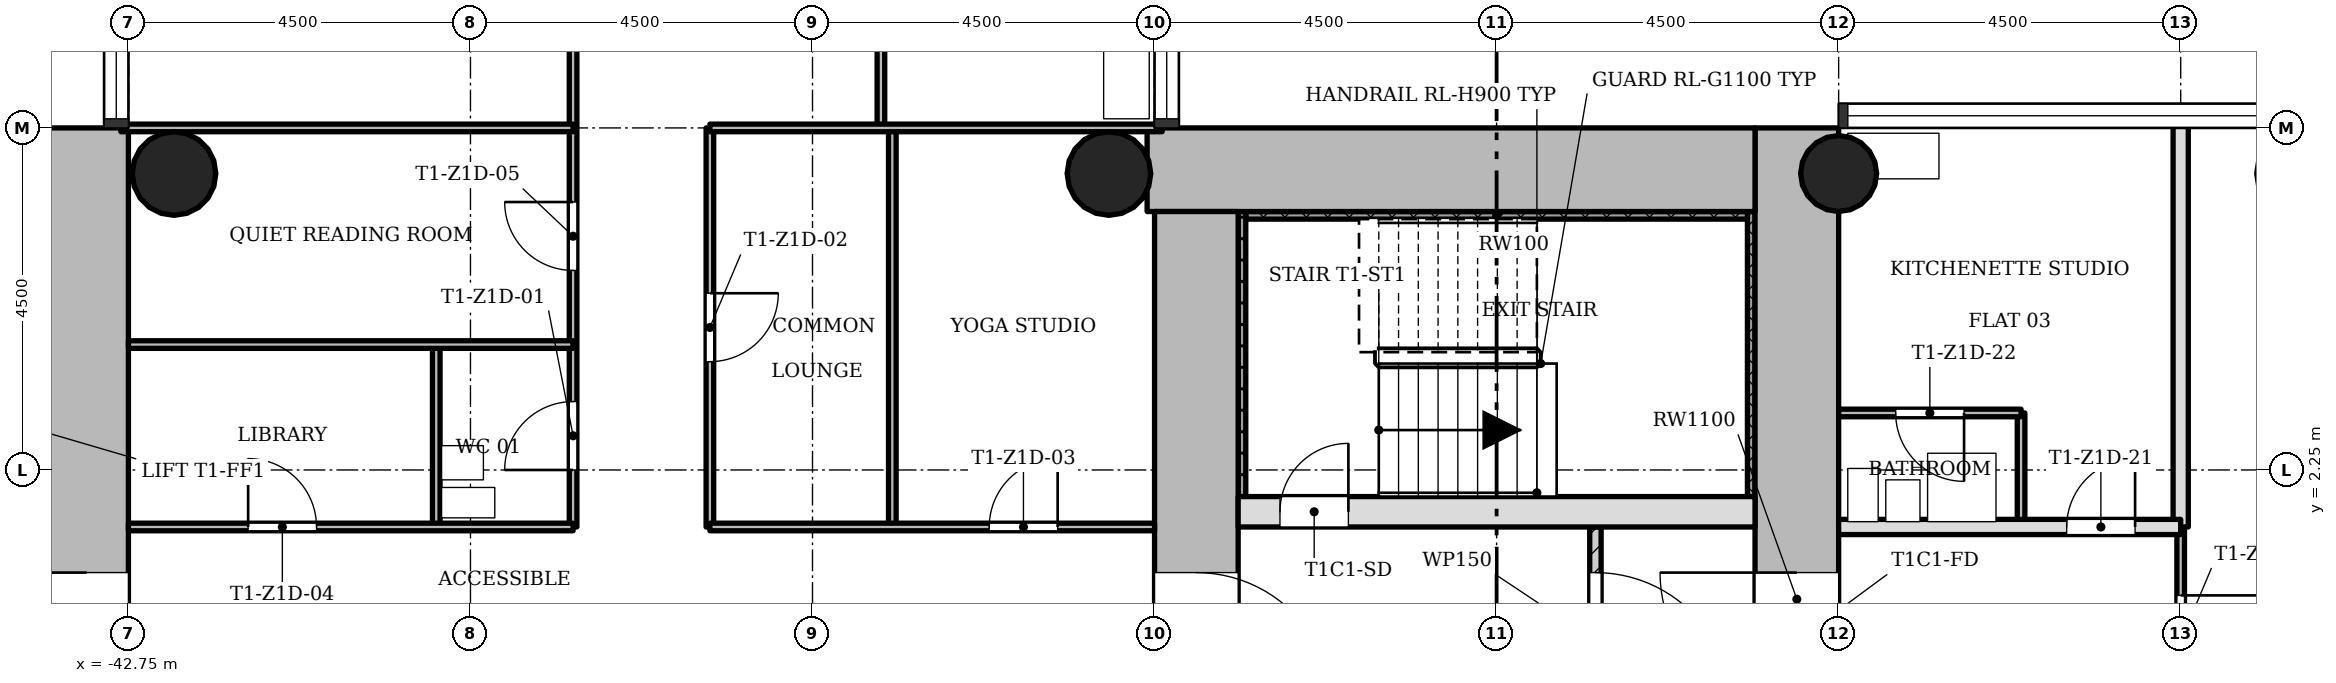
"""IFC4 building model, lengths in metres.
Left out: names, types, materials, properties, quantities, classifications, styles, units other than length and angle.
Written with IfcOpenShell. Run it as: python <this file> out.ifc"""

import sys

from ifc_helpers import new_model, si_unit, direction, frame, frame_2d, origin, origin_2d, place, context, subcontext, project, spatial, rectangle, hollow_circle, extrude, element, fill, save


model = new_model("IFC4")
c1 = context("Model", 3, precision=1e-05, world=origin(), true_north=direction((0.0, 1.0)))
c2 = subcontext(c1, "Body", "Model", "MODEL_VIEW")
j1 = project(units=[si_unit("LENGTHUNIT", "METRE"), si_unit("PLANEANGLEUNIT", "RADIAN")], contexts=[c1])
p1 = place(None, origin())
s1 = spatial("IfcSite", under=j1, at=p1, CompositionType="ELEMENT")
p2 = place(p1, origin())
s2 = spatial("IfcBuilding", under=s1, at=p2, CompositionType="ELEMENT")
p3 = place(p2, frame((0.0, 0.0, 61.9)))
s3 = spatial("IfcBuildingStorey", under=s2, at=p3, CompositionType="ELEMENT", Elevation=61.9)
p4 = place(p3, frame((-20.8, -5.65, 0.0), z_axis=(0.0, 0.0, 1.0), x_axis=(0.0, 1.0, 0.0)))
e1 = element("IfcWall", 1, at=p4, inside=s3, PredefinedType="SHEAR", context=c2, shape_type="SweptSolid", body=[
    extrude(rectangle(XDim=12.4, YDim=1.1, at=frame_2d((6.2, 0.0))), origin(), (0.0, 0.0, 1.0), 3.4),
])
p5 = place(p4, frame((4.75, 0.0, 0.0)))
e2 = element("IfcOpeningElement", 2, at=p5, cuts=e1, PredefinedType="OPENING", context=c2, shape_type="SweptSolid", body=[
    extrude(rectangle(XDim=1.8, YDim=2.1, at=frame_2d((0.9, 1.05))), frame((0.0, 0.56, 0.0), z_axis=(0.0, -1.0, 0.0), x_axis=(1.0, 0.0, 0.0)), (0.0, 0.0, 1.0), 1.12),
])
p6 = place(p3, frame((-21.35, 6.2, 0.0), z_axis=(0.0, 0.0, 1.0), x_axis=(-1.0, 0.0, 0.0)))
e3 = element("IfcWall", 3, at=p6, inside=s3, PredefinedType="SHEAR", context=c2, shape_type="SweptSolid", body=[
    extrude(rectangle(XDim=7.998, YDim=1.1, at=frame_2d((3.999, 0.0))), origin(), (0.0, 0.0, 1.0), 3.4),
])
p7 = place(p3, frame((-28.7, 5.65, 0.0), z_axis=(0.0, 0.0, 1.0), x_axis=(0.0, -1.0, 0.0)))
e4 = element("IfcWall", 4, at=p7, inside=s3, PredefinedType="SHEAR", context=c2, shape_type="SweptSolid", body=[
    extrude(rectangle(XDim=12.4, YDim=1.1, at=frame_2d((6.2, 0.0))), origin(), (0.0, 0.0, 1.0), 3.4),
])
p8 = place(p7, frame((4.75, 0.0, 0.0)))
e5 = element("IfcOpeningElement", 5, at=p8, cuts=e4, PredefinedType="OPENING", context=c2, shape_type="SweptSolid", body=[
    extrude(rectangle(XDim=1.8, YDim=2.1, at=frame_2d((0.9, 1.05))), frame((0.0, 0.56, 0.0), z_axis=(0.0, -1.0, 0.0), x_axis=(1.0, 0.0, 0.0)), (0.0, 0.0, 1.0), 1.12),
])
p9 = place(p3, frame((-28.15, 1.7, 0.0), z_axis=(0.0, 0.0, 1.0), x_axis=(1.0, 0.0, 0.0)))
e6 = element("IfcWall", 6, at=p9, inside=s3, PredefinedType="SHEAR", context=c2, shape_type="SweptSolid", body=[
    extrude(rectangle(XDim=6.8, YDim=0.4, at=frame_2d((3.4, 0.0))), origin(), (0.0, 0.0, 1.0), 3.4),
])
p10 = place(p9, frame((0.55, 0.0, 0.0)))
e7 = element("IfcOpeningElement", 7, at=p10, cuts=e6, PredefinedType="OPENING", context=c2, shape_type="SweptSolid", body=[
    extrude(rectangle(XDim=0.9, YDim=2.1, at=frame_2d((0.45, 1.05))), frame((0.0, 0.21, 0.0), z_axis=(0.0, -1.0, 0.0), x_axis=(1.0, 0.0, 0.0)), (0.0, 0.0, 1.0), 0.42),
])
p11 = place(p3, frame((-43.3, -5.65, 0.0), z_axis=(0.0, 0.0, 1.0), x_axis=(0.0, 1.0, 0.0)))
e8 = element("IfcWall", 8, at=p11, inside=s3, PredefinedType="SHEAR", context=c2, shape_type="SweptSolid", body=[
    extrude(rectangle(XDim=12.4, YDim=1.1, at=frame_2d((6.2, 0.0))), origin(), (0.0, 0.0, 1.0), 3.4),
])
p12 = place(p11, frame((4.75, 0.0, 0.0)))
e9 = element("IfcOpeningElement", 9, at=p12, cuts=e8, PredefinedType="OPENING", context=c2, shape_type="SweptSolid", body=[
    extrude(rectangle(XDim=1.8, YDim=2.1, at=frame_2d((0.9, 1.05))), frame((0.0, 0.56, 0.0), z_axis=(0.0, -1.0, 0.0), x_axis=(1.0, 0.0, 0.0)), (0.0, 0.0, 1.0), 1.12),
])
p13 = place(p3, frame((-20.25, 6.15, 0.0), z_axis=(0.0, 0.0, 1.0), x_axis=(1.0, 0.0, 0.0)))
e10 = element("IfcColumn", 10, at=p13, inside=s3, PredefinedType="COLUMN", context=c2, shape_type="SweptSolid", body=[
    extrude(hollow_circle(Radius=0.5, WallThickness=0.036, at=origin_2d()), origin(), (0.0, 0.0, 1.0), 3.4),
])
for number, where, z_axis, x_axis in (
    (11, (-29.85, 6.15, 0.0), (0.0, 0.0, 1.0), (1.0, 0.0, 0.0)),
    (12, (-42.15, 6.15, 0.0), (0.0, 0.0, 1.0), (1.0, 0.0, 0.0)),
):
    element("IfcColumn", number, at=place(p3, frame(where, z_axis=z_axis, x_axis=x_axis)), inside=s3, PredefinedType="COLUMN", context=c2, shape_type="SweptSolid", body=[
        extrude(hollow_circle(Radius=0.55, WallThickness=0.04, at=origin_2d()), origin(), (0.0, 0.0, 1.0), 3.4),
    ])
p14 = place(p3, frame((-23.45, -1.5, 0.0), z_axis=(0.0, 0.0, 1.0), x_axis=(0.0, 1.0, 0.0)))
e13 = element("IfcWall", 13, at=p14, inside=s3, PredefinedType="PARTITIONING", context=c2, shape_type="SweptSolid", body=[
    extrude(rectangle(XDim=3.0, YDim=0.15, at=frame_2d((1.5, 0.0))), origin(), (0.0, 0.0, 1.0), 3.0),
])
p15 = place(p14, frame((0.6, 0.0, 0.0)))
e14 = element("IfcOpeningElement", 14, at=p15, cuts=e13, PredefinedType="OPENING", context=c2, shape_type="SweptSolid", body=[
    extrude(rectangle(XDim=1.8, YDim=2.1, at=frame_2d((0.9, 1.05))), frame((0.0, 0.085, 0.0), z_axis=(0.0, -1.0, 0.0), x_axis=(1.0, 0.0, 0.0)), (0.0, 0.0, 1.0), 0.17),
])
p16 = place(p3, frame((-38.7, 1.5, 0.0), z_axis=(0.0, 0.0, 1.0), x_axis=(0.0, 1.0, 0.0)))
e15 = element("IfcWall", 15, at=p16, inside=s3, PredefinedType="PARTITIONING", context=c2, shape_type="SweptSolid", body=[
    extrude(rectangle(XDim=2.4, YDim=0.1, at=frame_2d((1.2, 0.0))), origin(), (0.0, 0.0, 1.0), 3.0),
])
p17 = place(p3, frame((-36.9, 1.5, 0.0), z_axis=(0.0, 0.0, 1.0), x_axis=(0.0, 1.0, 0.0)))
e16 = element("IfcWall", 16, at=p17, inside=s3, PredefinedType="PARTITIONING", context=c2, shape_type="SweptSolid", body=[
    extrude(rectangle(XDim=7.05, YDim=0.1, at=frame_2d((3.525, 0.0))), origin(), (0.0, 0.0, 1.0), 3.0),
])
p18 = place(p17, frame((0.75, 0.0, 0.0)))
e17 = element("IfcOpeningElement", 17, at=p18, cuts=e16, PredefinedType="OPENING", context=c2, shape_type="SweptSolid", body=[
    extrude(rectangle(XDim=0.9, YDim=2.1, at=frame_2d((0.45, 1.05))), frame((0.0, 0.06, 0.0), z_axis=(0.0, -1.0, 0.0), x_axis=(1.0, 0.0, 0.0)), (0.0, 0.0, 1.0), 0.12),
])
p19 = place(p17, frame((3.375, 0.0, 0.0)))
e18 = element("IfcOpeningElement", 18, at=p19, cuts=e16, PredefinedType="OPENING", context=c2, shape_type="SweptSolid", body=[
    extrude(rectangle(XDim=0.9, YDim=2.1, at=frame_2d((0.45, 1.05))), frame((0.0, 0.06, 0.0), z_axis=(0.0, -1.0, 0.0), x_axis=(1.0, 0.0, 0.0)), (0.0, 0.0, 1.0), 0.12),
])
p20 = place(p3, frame((-35.1, 1.5, 0.0), z_axis=(0.0, 0.0, 1.0), x_axis=(0.0, 1.0, 0.0)))
e19 = element("IfcWall", 19, at=p20, inside=s3, PredefinedType="PARTITIONING", context=c2, shape_type="SweptSolid", body=[
    extrude(rectangle(XDim=5.25, YDim=0.1, at=frame_2d((2.625, 0.0))), origin(), (0.0, 0.0, 1.0), 3.0),
])
p21 = place(p20, frame((2.175, 0.0, 0.0)))
e20 = element("IfcOpeningElement", 20, at=p21, cuts=e19, PredefinedType="OPENING", context=c2, shape_type="SweptSolid", body=[
    extrude(rectangle(XDim=0.9, YDim=2.1, at=frame_2d((0.45, 1.05))), frame((0.0, 0.06, 0.0), z_axis=(0.0, -1.0, 0.0), x_axis=(1.0, 0.0, 0.0)), (0.0, 0.0, 1.0), 0.12),
])
p22 = place(p3, frame((-32.85, 6.75, 0.0), z_axis=(0.0, 0.0, 1.0), x_axis=(0.0, 1.0, 0.0)))
e21 = element("IfcWall", 21, at=p22, inside=s3, PredefinedType="PARTITIONING", context=c2, shape_type="SweptSolid", body=[
    extrude(rectangle(XDim=9.0, YDim=0.1, at=frame_2d((4.5, 0.0))), origin(), (0.0, 0.0, 1.0), 3.0),
])
p23 = place(p22, frame((1.8, 0.0, 0.0)))
e22 = element("IfcOpeningElement", 22, at=p23, cuts=e21, PredefinedType="OPENING", context=c2, shape_type="SweptSolid", body=[
    extrude(rectangle(XDim=0.9, YDim=2.1, at=frame_2d((0.45, 1.05))), frame((0.0, 0.06, 0.0), z_axis=(0.0, -1.0, 0.0), x_axis=(1.0, 0.0, 0.0)), (0.0, 0.0, 1.0), 0.12),
])
p24 = place(p22, frame((6.3, 0.0, 0.0)))
e23 = element("IfcOpeningElement", 23, at=p24, cuts=e21, PredefinedType="OPENING", context=c2, shape_type="SweptSolid", body=[
    extrude(rectangle(XDim=0.9, YDim=2.1, at=frame_2d((0.45, 1.05))), frame((0.0, 0.06, 0.0), z_axis=(0.0, -1.0, 0.0), x_axis=(1.0, 0.0, 0.0)), (0.0, 0.0, 1.0), 0.12),
])
p25 = place(p3, frame((-32.7, 1.5, 0.0), z_axis=(0.0, 0.0, 1.0), x_axis=(0.0, 1.0, 0.0)))
e24 = element("IfcWall", 24, at=p25, inside=s3, PredefinedType="PARTITIONING", context=c2, shape_type="SweptSolid", body=[
    extrude(rectangle(XDim=5.25, YDim=0.1, at=frame_2d((2.625, 0.0))), origin(), (0.0, 0.0, 1.0), 3.0),
])
p26 = place(p3, frame((-17.85, 1.5, 0.0), z_axis=(0.0, 0.0, 1.0), x_axis=(0.0, 1.0, 0.0)))
e25 = element("IfcWall", 25, at=p26, inside=s3, PredefinedType="PARTITIONING", context=c2, shape_type="SweptSolid", body=[
    extrude(rectangle(XDim=1.5, YDim=0.1, at=frame_2d((0.75, 0.0))), origin(), (0.0, 0.0, 1.0), 3.0),
])
p27 = place(p3, frame((-15.75, -6.85, 0.0), z_axis=(0.0, 0.0, 1.0), x_axis=(0.0, 1.0, 0.0)))
e26 = element("IfcWall", 26, at=p27, inside=s3, PredefinedType="PARTITIONING", context=c2, shape_type="SweptSolid", body=[
    extrude(rectangle(XDim=8.35, YDim=0.1, at=frame_2d((4.175, 0.0))), origin(), (0.0, 0.0, 1.0), 3.0),
])
p28 = place(p27, frame((6.25, 0.0, 0.0)))
e27 = element("IfcOpeningElement", 27, at=p28, cuts=e26, PredefinedType="OPENING", context=c2, shape_type="SweptSolid", body=[
    extrude(rectangle(XDim=1.2, YDim=2.1, at=frame_2d((0.6, 1.05))), frame((0.0, 0.06, 0.0), z_axis=(0.0, -1.0, 0.0), x_axis=(1.0, 0.0, 0.0)), (0.0, 0.0, 1.0), 0.12),
])
p29 = place(p3, frame((-15.75, 1.5, 0.0), z_axis=(0.0, 0.0, 1.0), x_axis=(0.0, 1.0, 0.0)))
e28 = element("IfcWall", 28, at=p29, inside=s3, PredefinedType="SOLIDWALL", context=c2, shape_type="SweptSolid", body=[
    extrude(rectangle(XDim=5.35, YDim=0.2, at=frame_2d((2.675, 0.0))), origin(), (0.0, 0.0, 1.0), 3.0),
])
p30 = place(p3, frame((-42.75, 1.5, 0.0), z_axis=(0.0, 0.0, 1.0), x_axis=(1.0, 0.0, 0.0)))
e29 = element("IfcWall", 29, at=p30, inside=s3, PredefinedType="PARTITIONING", context=c2, shape_type="SweptSolid", body=[
    extrude(rectangle(XDim=5.85, YDim=0.1, at=frame_2d((2.925, 0.0))), origin(), (0.0, 0.0, 1.0), 3.0),
])
p31 = place(p30, frame((1.575, 0.0, 0.0)))
e30 = element("IfcOpeningElement", 30, at=p31, cuts=e29, PredefinedType="OPENING", context=c2, shape_type="SweptSolid", body=[
    extrude(rectangle(XDim=0.9, YDim=2.1, at=frame_2d((0.45, 1.05))), frame((0.0, 0.06, 0.0), z_axis=(0.0, -1.0, 0.0), x_axis=(1.0, 0.0, 0.0)), (0.0, 0.0, 1.0), 0.12),
])
p32 = place(p3, frame((-35.1, 1.5, 0.0), z_axis=(0.0, 0.0, 1.0), x_axis=(1.0, 0.0, 0.0)))
e31 = element("IfcWall", 31, at=p32, inside=s3, PredefinedType="PARTITIONING", context=c2, shape_type="SweptSolid", body=[
    extrude(rectangle(XDim=5.85, YDim=0.1, at=frame_2d((2.925, 0.0))), origin(), (0.0, 0.0, 1.0), 3.0),
])
p33 = place(p32, frame((3.675, 0.0, 0.0)))
e32 = element("IfcOpeningElement", 32, at=p33, cuts=e31, PredefinedType="OPENING", context=c2, shape_type="SweptSolid", body=[
    extrude(rectangle(XDim=0.9, YDim=2.1, at=frame_2d((0.45, 1.05))), frame((0.0, 0.06, 0.0), z_axis=(0.0, -1.0, 0.0), x_axis=(1.0, 0.0, 0.0)), (0.0, 0.0, 1.0), 0.12),
])
p34 = place(p3, frame((-20.25, 1.5, 0.0), z_axis=(0.0, 0.0, 1.0), x_axis=(1.0, 0.0, 0.0)))
e33 = element("IfcWall", 33, at=p34, inside=s3, PredefinedType="SOLIDWALL", context=c2, shape_type="SweptSolid", body=[
    extrude(rectangle(XDim=4.5, YDim=0.2, at=frame_2d((2.25, 0.0))), origin(), (0.0, 0.0, 1.0), 3.0),
])
p35 = place(p34, frame((3.0, 0.0, 0.0)))
e34 = element("IfcOpeningElement", 34, at=p35, cuts=e33, PredefinedType="OPENING", context=c2, shape_type="SweptSolid", body=[
    extrude(rectangle(XDim=0.9, YDim=2.1, at=frame_2d((0.45, 1.05))), frame((0.0, 0.11, 0.0), z_axis=(0.0, -1.0, 0.0), x_axis=(1.0, 0.0, 0.0)), (0.0, 0.0, 1.0), 0.22),
])
p36 = place(p3, frame((-20.25, 3.0, 0.0), z_axis=(0.0, 0.0, 1.0), x_axis=(1.0, 0.0, 0.0)))
e35 = element("IfcWall", 35, at=p36, inside=s3, PredefinedType="PARTITIONING", context=c2, shape_type="SweptSolid", body=[
    extrude(rectangle(XDim=2.4, YDim=0.1, at=frame_2d((1.2, 0.0))), origin(), (0.0, 0.0, 1.0), 3.0),
])
p37 = place(p36, frame((0.75, 0.0, 0.0)))
e36 = element("IfcOpeningElement", 36, at=p37, cuts=e35, PredefinedType="OPENING", context=c2, shape_type="SweptSolid", body=[
    extrude(rectangle(XDim=0.9, YDim=2.1, at=frame_2d((0.45, 1.05))), frame((0.0, 0.06, 0.0), z_axis=(0.0, -1.0, 0.0), x_axis=(1.0, 0.0, 0.0)), (0.0, 0.0, 1.0), 0.12),
])
p38 = place(p3, frame((-42.75, 3.9, 0.0), z_axis=(0.0, 0.0, 1.0), x_axis=(1.0, 0.0, 0.0)))
e37 = element("IfcWall", 37, at=p38, inside=s3, PredefinedType="PARTITIONING", context=c2, shape_type="SweptSolid", body=[
    extrude(rectangle(XDim=5.85, YDim=0.1, at=frame_2d((2.925, 0.0))), origin(), (0.0, 0.0, 1.0), 3.0),
])
for number, where, z_axis, x_axis in (
    (38, (-42.85, 6.75, 0.0), (0.0, 0.0, 1.0), (1.0, 0.0, 0.0)),
    (39, (-35.1, 6.75, 0.0), (0.0, 0.0, 1.0), (1.0, 0.0, 0.0)),
):
    element("IfcWall", number, at=place(p3, frame(where, z_axis=z_axis, x_axis=x_axis)), inside=s3, PredefinedType="PARTITIONING", context=c2, shape_type="SweptSolid", body=[
        extrude(rectangle(XDim=5.95, YDim=0.1, at=frame_2d((2.975, 0.0))), origin(), (0.0, 0.0, 1.0), 3.0),
    ])
p39 = place(p3, frame((-21.4, 1.9, 0.0), z_axis=(0.0, 0.0, 1.0), x_axis=(0.0, 1.0, 0.0)))
e40 = element("IfcWall", 40, at=p39, inside=s3, PredefinedType="SHEAR", context=c2, shape_type="SweptSolid", body=[
    extrude(rectangle(XDim=3.75, YDim=0.1, at=frame_2d((1.875, 0.0))), origin(), (0.0, 0.0, 1.0), 3.4),
])
p40 = place(p3, frame((-28.05, 5.6, 0.0), z_axis=(0.0, 0.0, 1.0), x_axis=(1.0, 0.0, 0.0)))
e41 = element("IfcWall", 41, at=p40, inside=s3, PredefinedType="SHEAR", context=c2, shape_type="SweptSolid", body=[
    extrude(rectangle(XDim=6.6, YDim=0.1, at=frame_2d((3.3, 0.0))), origin(), (0.0, 0.0, 1.0), 3.4),
])
p41 = place(p3, frame((-28.1, 1.9, 0.0), z_axis=(0.0, 0.0, 1.0), x_axis=(0.0, 1.0, 0.0)))
e42 = element("IfcWall", 42, at=p41, inside=s3, PredefinedType="SHEAR", context=c2, shape_type="SweptSolid", body=[
    extrude(rectangle(XDim=3.75, YDim=0.1, at=frame_2d((1.875, 0.0))), origin(), (0.0, 0.0, 1.0), 3.4),
])
p42 = place(p15, origin())
e43 = element("IfcDoor", 43, at=p42, inside=s3, OperationType="SINGLE_SWING_LEFT", PredefinedType="DOOR", context=c2, shape_type="SweptSolid", body=[
    extrude(rectangle(XDim=1.8, YDim=2.1, at=frame_2d((0.9, 1.05))), frame((0.0, 0.025, 0.0), z_axis=(0.0, -1.0, 0.0), x_axis=(1.0, 0.0, 0.0)), (0.0, 0.0, 1.0), 0.05),
])
fill(e14, e43)
p43 = place(p18, origin())
e44 = element("IfcDoor", 44, at=p43, inside=s3, OperationType="SINGLE_SWING_RIGHT", PredefinedType="DOOR", context=c2, shape_type="SweptSolid", body=[
    extrude(rectangle(XDim=0.9, YDim=2.1, at=frame_2d((0.45, 1.05))), frame((0.0, 0.025, 0.0), z_axis=(0.0, -1.0, 0.0), x_axis=(1.0, 0.0, 0.0)), (0.0, 0.0, 1.0), 0.05),
])
fill(e17, e44)
p44 = place(p21, origin())
e45 = element("IfcDoor", 45, at=p44, inside=s3, OperationType="SINGLE_SWING_RIGHT", PredefinedType="DOOR", context=c2, shape_type="SweptSolid", body=[
    extrude(rectangle(XDim=0.9, YDim=2.1, at=frame_2d((0.45, 1.05))), frame((0.0, 0.025, 0.0), z_axis=(0.0, -1.0, 0.0), x_axis=(1.0, 0.0, 0.0)), (0.0, 0.0, 1.0), 0.05),
])
fill(e20, e45)
p45 = place(p33, origin())
e46 = element("IfcDoor", 46, at=p45, inside=s3, OperationType="SINGLE_SWING_LEFT", PredefinedType="DOOR", context=c2, shape_type="SweptSolid", body=[
    extrude(rectangle(XDim=0.9, YDim=2.1, at=frame_2d((0.45, 1.05))), frame((0.0, 0.025, 0.0), z_axis=(0.0, -1.0, 0.0), x_axis=(1.0, 0.0, 0.0)), (0.0, 0.0, 1.0), 0.05),
])
fill(e32, e46)
p46 = place(p31, origin())
e47 = element("IfcDoor", 47, at=p46, inside=s3, OperationType="SINGLE_SWING_RIGHT", PredefinedType="DOOR", context=c2, shape_type="SweptSolid", body=[
    extrude(rectangle(XDim=0.9, YDim=2.1, at=frame_2d((0.45, 1.05))), frame((0.0, 0.025, 0.0), z_axis=(0.0, -1.0, 0.0), x_axis=(1.0, 0.0, 0.0)), (0.0, 0.0, 1.0), 0.05),
])
fill(e30, e47)
p47 = place(p19, origin())
e48 = element("IfcDoor", 48, at=p47, inside=s3, OperationType="SINGLE_SWING_LEFT", PredefinedType="DOOR", context=c2, shape_type="SweptSolid", body=[
    extrude(rectangle(XDim=0.9, YDim=2.1, at=frame_2d((0.45, 1.05))), frame((0.0, 0.025, 0.0), z_axis=(0.0, -1.0, 0.0), x_axis=(1.0, 0.0, 0.0)), (0.0, 0.0, 1.0), 0.05),
])
fill(e18, e48)
p48 = place(p35, origin())
e49 = element("IfcDoor", 49, at=p48, inside=s3, OperationType="SINGLE_SWING_LEFT", PredefinedType="DOOR", context=c2, shape_type="SweptSolid", body=[
    extrude(rectangle(XDim=0.9, YDim=2.1, at=frame_2d((0.45, 1.05))), frame((0.0, 0.025, 0.0), z_axis=(0.0, -1.0, 0.0), x_axis=(1.0, 0.0, 0.0)), (0.0, 0.0, 1.0), 0.05),
])
fill(e34, e49)
p49 = place(p37, origin())
e50 = element("IfcDoor", 50, at=p49, inside=s3, OperationType="SINGLE_SWING_RIGHT", PredefinedType="DOOR", context=c2, shape_type="SweptSolid", body=[
    extrude(rectangle(XDim=0.9, YDim=2.1, at=frame_2d((0.45, 1.05))), frame((0.0, 0.025, 0.0), z_axis=(0.0, -1.0, 0.0), x_axis=(1.0, 0.0, 0.0)), (0.0, 0.0, 1.0), 0.05),
])
fill(e36, e50)
p50 = place(p28, origin())
e51 = element("IfcDoor", 51, at=p50, inside=s3, OperationType="SINGLE_SWING_RIGHT", PredefinedType="DOOR", context=c2, shape_type="SweptSolid", body=[
    extrude(rectangle(XDim=1.2, YDim=2.1, at=frame_2d((0.6, 1.05))), frame((0.0, 0.025, 0.0), z_axis=(0.0, -1.0, 0.0), x_axis=(1.0, 0.0, 0.0)), (0.0, 0.0, 1.0), 0.05),
])
fill(e27, e51)
p51 = place(p10, origin())
e52 = element("IfcDoor", 52, at=p51, inside=s3, OperationType="SINGLE_SWING_LEFT", PredefinedType="DOOR", context=c2, shape_type="SweptSolid", body=[
    extrude(rectangle(XDim=0.9, YDim=2.1, at=frame_2d((0.45, 1.05))), frame((0.0, 0.025, 0.0), z_axis=(0.0, -1.0, 0.0), x_axis=(1.0, 0.0, 0.0)), (0.0, 0.0, 1.0), 0.05),
])
fill(e7, e52)
p52 = place(p8, origin())
e53 = element("IfcDoor", 53, at=p52, inside=s3, OperationType="SINGLE_SWING_LEFT", PredefinedType="DOOR", context=c2, shape_type="SweptSolid", body=[
    extrude(rectangle(XDim=1.8, YDim=2.1, at=frame_2d((0.9, 1.05))), frame((0.0, 0.025, 0.0), z_axis=(0.0, -1.0, 0.0), x_axis=(1.0, 0.0, 0.0)), (0.0, 0.0, 1.0), 0.05),
])
fill(e5, e53)
p53 = place(p5, origin())
e54 = element("IfcDoor", 54, at=p53, inside=s3, OperationType="SINGLE_SWING_LEFT", PredefinedType="DOOR", context=c2, shape_type="SweptSolid", body=[
    extrude(rectangle(XDim=1.8, YDim=2.1, at=frame_2d((0.9, 1.05))), frame((0.0, 0.025, 0.0), z_axis=(0.0, -1.0, 0.0), x_axis=(1.0, 0.0, 0.0)), (0.0, 0.0, 1.0), 0.05),
])
fill(e2, e54)
p54 = place(p12, origin())
e55 = element("IfcDoor", 55, at=p54, inside=s3, OperationType="SINGLE_SWING_LEFT", PredefinedType="DOOR", context=c2, shape_type="SweptSolid", body=[
    extrude(rectangle(XDim=1.8, YDim=2.1, at=frame_2d((0.9, 1.05))), frame((0.0, 0.025, 0.0), z_axis=(0.0, -1.0, 0.0), x_axis=(1.0, 0.0, 0.0)), (0.0, 0.0, 1.0), 0.05),
])
fill(e9, e55)
save(model, sys.argv[1])
